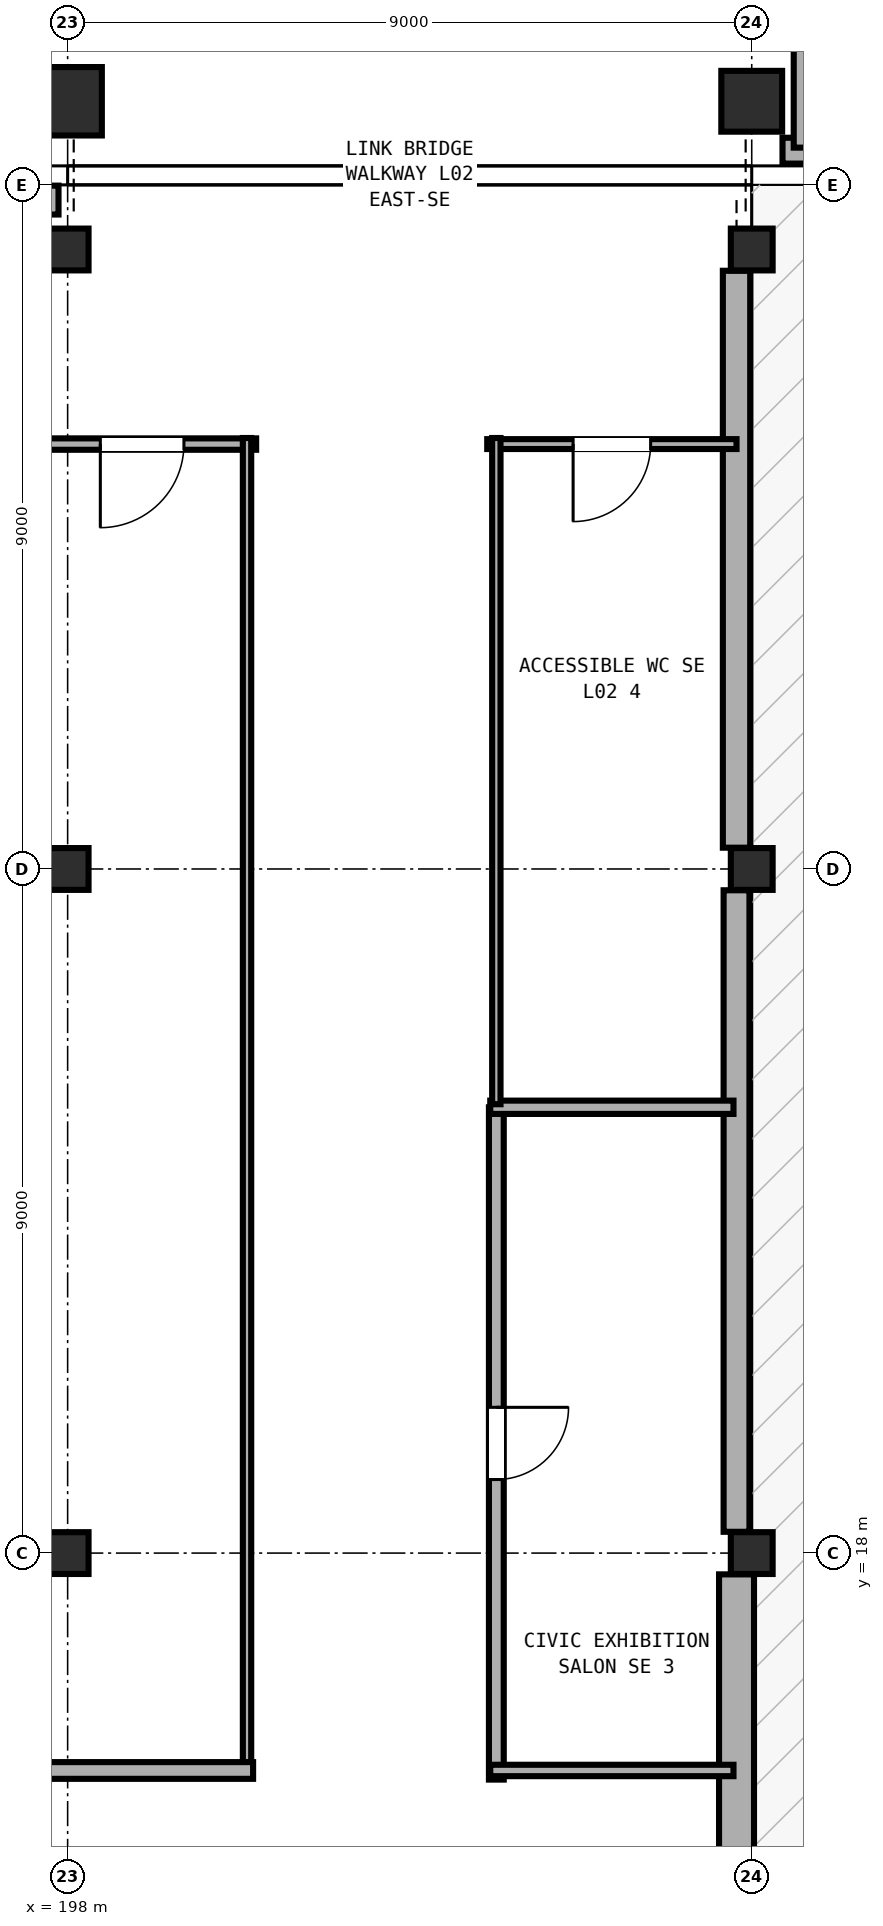
"""IFC4 building model, lengths in metres.
Left out: names, types, materials, properties, quantities, classifications, styles, units other than length and angle.
Written with IfcOpenShell. Run it as: python <this file> out.ifc"""

import sys

from ifc_helpers import new_model, si_unit, direction, frame, frame_2d, origin, origin_2d, place, context, subcontext, project, spatial, rectangle, extrude, element, fill, save


model = new_model("IFC4")
c1 = context("Model", 3, precision=1e-05, world=origin(), true_north=direction((0.0, 1.0)))
c2 = subcontext(c1, "Body", "Model", "MODEL_VIEW")
j1 = project(units=[si_unit("LENGTHUNIT", "METRE"), si_unit("PLANEANGLEUNIT", "RADIAN")], contexts=[c1])
p1 = place(None, origin())
s1 = spatial("IfcSite", under=j1, at=p1, CompositionType="ELEMENT")
p2 = place(p1, origin())
s2 = spatial("IfcBuilding", under=s1, at=p2, CompositionType="ELEMENT")
p3 = place(p2, frame((0.0, 0.0, 9.6)))
s3 = spatial("IfcBuildingStorey", under=s2, at=p3, CompositionType="ELEMENT", Elevation=9.6)
p4 = place(p3, frame((198.0, 37.1, 0.0), z_axis=(0.0, 0.0, 1.0), x_axis=(1.0, 0.0, 0.0)))
e1 = element("IfcColumn", 1, at=p4, inside=s3, PredefinedType="COLUMN", context=c2, shape_type="SweptSolid", body=[
    extrude(rectangle(XDim=0.9, YDim=0.9, at=origin_2d()), origin(), (0.0, 0.0, 1.0), 4.8),
])
p5 = place(p3, frame((207.0, 37.1, 0.0), z_axis=(0.0, 0.0, 1.0), x_axis=(1.0, 0.0, 0.0)))
e2 = element("IfcColumn", 2, at=p5, inside=s3, PredefinedType="COLUMN", context=c2, shape_type="SweptSolid", body=[
    extrude(rectangle(XDim=0.8, YDim=0.8, at=origin_2d()), origin(), (0.0, 0.0, 1.0), 4.8),
])
for number, where, z_axis, x_axis in (
    (3, (198.0, 18.0, 0.0), (0.0, 0.0, 1.0), (1.0, 0.0, 0.0)),
    (4, (198.0, 27.0, 0.0), (0.0, 0.0, 1.0), (1.0, 0.0, 0.0)),
    (5, (198.0, 35.15, 0.0), (0.0, 0.0, 1.0), (1.0, 0.0, 0.0)),
    (6, (207.0, 18.0, 0.0), (0.0, 0.0, 1.0), (1.0, 0.0, 0.0)),
    (7, (207.0, 27.0, 0.0), (0.0, 0.0, 1.0), (1.0, 0.0, 0.0)),
    (8, (207.0, 35.15, 0.0), (0.0, 0.0, 1.0), (1.0, 0.0, 0.0)),
):
    element("IfcColumn", number, at=place(p3, frame(where, z_axis=z_axis, x_axis=x_axis)), inside=s3, PredefinedType="COLUMN", context=c2, shape_type="SweptSolid", body=[
        extrude(rectangle(XDim=0.55, YDim=0.55, at=origin_2d()), origin(), (0.0, 0.0, 1.0), 4.8),
    ])
p6 = place(p3, frame((215.595, 36.45, 0.0), z_axis=(0.0, 0.0, 1.0), x_axis=(-1.0, 0.0, 0.0)))
e9 = element("IfcWall", 9, at=p6, inside=s3, PredefinedType="SOLIDWALL", context=c2, shape_type="SweptSolid", body=[
    extrude(rectangle(XDim=8.19, YDim=0.34, at=frame_2d((4.095, 0.0))), origin(), (0.0, 0.0, 1.0), 3.58),
])
p7 = place(p6, frame((3.07, 0.0, 0.0)))
e10 = element("IfcOpeningElement", 10, at=p7, cuts=e9, PredefinedType="OPENING", context=c2, shape_type="SweptSolid", body=[
    extrude(rectangle(XDim=2.05, YDim=2.3, at=frame_2d((1.025, 1.15))), frame((0.0, 0.18, 0.0), z_axis=(0.0, -1.0, 0.0), x_axis=(1.0, 0.0, 0.0)), (0.0, 0.0, 1.0), 0.36),
])
p8 = place(p3, frame((188.96, 35.8, 0.0), z_axis=(0.0, 0.0, 1.0), x_axis=(1.0, 0.0, 0.0)))
e11 = element("IfcWall", 11, at=p8, inside=s3, PredefinedType="SOLIDWALL", context=c2, shape_type="SweptSolid", body=[
    extrude(rectangle(XDim=8.92, YDim=0.38, at=frame_2d((4.46, 0.0))), origin(), (0.0, 0.0, 1.0), 3.58),
])
p9 = place(p8, frame((2.91, 0.0, 0.9)))
e12 = element("IfcOpeningElement", 12, at=p9, cuts=e11, PredefinedType="OPENING", context=c2, shape_type="SweptSolid", body=[
    extrude(rectangle(XDim=3.1, YDim=2.1, at=frame_2d((1.55, 1.05))), frame((0.0, 0.2, 0.0), z_axis=(0.0, -1.0, 0.0), x_axis=(1.0, 0.0, 0.0)), (0.0, 0.0, 1.0), 0.4),
])
p10 = place(p3, frame((206.8, 34.87, 0.0), z_axis=(0.0, 0.0, 1.0), x_axis=(0.0, -1.0, 0.0)))
e13 = element("IfcWall", 13, at=p10, inside=s3, PredefinedType="SOLIDWALL", context=c2, shape_type="SweptSolid", body=[
    extrude(rectangle(XDim=7.59, YDim=0.36, at=frame_2d((3.795, 0.0))), origin(), (0.0, 0.0, 1.0), 3.58),
])
p11 = place(p3, frame((206.8, 26.72, 0.0), z_axis=(0.0, 0.0, 1.0), x_axis=(0.0, -1.0, 0.0)))
e14 = element("IfcWall", 14, at=p11, inside=s3, PredefinedType="SOLIDWALL", context=c2, shape_type="SweptSolid", body=[
    extrude(rectangle(XDim=8.44, YDim=0.34, at=frame_2d((4.22, 0.0))), origin(), (0.0, 0.0, 1.0), 3.58),
])
p12 = place(p3, frame((206.8, 17.72, 0.0), z_axis=(0.0, 0.0, 1.0), x_axis=(0.0, -1.0, 0.0)))
e15 = element("IfcWall", 15, at=p12, inside=s3, PredefinedType="SOLIDWALL", context=c2, shape_type="SweptSolid", body=[
    extrude(rectangle(XDim=8.44, YDim=0.46, at=frame_2d((4.22, 0.0))), origin(), (0.0, 0.0, 1.0), 3.58),
])
p13 = place(p3, frame((207.64, 36.49, 0.0), z_axis=(0.0, 0.0, 1.0), x_axis=(0.0, 1.0, 0.0)))
e16 = element("IfcWall", 16, at=p13, inside=s3, PredefinedType="PARTITIONING", context=c2, shape_type="SweptSolid", body=[
    extrude(rectangle(XDim=3.01, YDim=0.175, at=frame_2d((1.505, 0.0))), origin(), (0.0, 0.0, 1.0), 3.56),
])
p14 = place(p3, frame((200.48, 32.59, 0.0), z_axis=(0.0, 0.0, 1.0), x_axis=(-1.0, 0.0, 0.0)))
e17 = element("IfcWall", 17, at=p14, inside=s3, PredefinedType="PARTITIONING", context=c2, shape_type="SweptSolid", body=[
    extrude(rectangle(XDim=3.0, YDim=0.15, at=frame_2d((1.5, 0.0))), origin(), (0.0, 0.0, 1.0), 3.56),
])
p15 = place(p14, frame((0.95, 0.0, 0.0)))
e18 = element("IfcOpeningElement", 18, at=p15, cuts=e17, PredefinedType="OPENING", context=c2, shape_type="SweptSolid", body=[
    extrude(rectangle(XDim=1.1, YDim=2.1, at=frame_2d((0.55, 1.05))), frame((0.0, 0.085, 0.0), z_axis=(0.0, -1.0, 0.0), x_axis=(1.0, 0.0, 0.0)), (0.0, 0.0, 1.0), 0.17),
])
p16 = place(p3, frame((200.36, 32.67, 0.0), z_axis=(0.0, 0.0, 1.0), x_axis=(0.0, -1.0, 0.0)))
e19 = element("IfcWall", 19, at=p16, inside=s3, PredefinedType="PARTITIONING", context=c2, shape_type="SweptSolid", body=[
    extrude(rectangle(XDim=17.61, YDim=0.11, at=frame_2d((8.805, 0.0))), origin(), (0.0, 0.0, 1.0), 3.56),
])
p17 = place(p3, frame((200.44, 15.14, 0.0), z_axis=(0.0, 0.0, 1.0), x_axis=(-1.0, 0.0, 0.0)))
e20 = element("IfcWall", 20, at=p17, inside=s3, PredefinedType="PARTITIONING", context=c2, shape_type="SweptSolid", body=[
    extrude(rectangle(XDim=14.78, YDim=0.22, at=frame_2d((7.39, 0.0))), origin(), (0.0, 0.0, 1.0), 3.56),
])
p18 = place(p3, frame((203.64, 23.865, 0.0), z_axis=(0.0, 0.0, 1.0), x_axis=(0.0, -1.0, 0.0)))
e21 = element("IfcWall", 21, at=p18, inside=s3, PredefinedType="PARTITIONING", context=c2, shape_type="SweptSolid", body=[
    extrude(rectangle(XDim=8.845, YDim=0.195, at=frame_2d((4.422, 0.0))), origin(), (0.0, 0.0, 1.0), 3.56),
])
p19 = place(p18, frame((3.948, 0.0, 0.0)))
e22 = element("IfcOpeningElement", 22, at=p19, cuts=e21, PredefinedType="OPENING", context=c2, shape_type="SweptSolid", body=[
    extrude(rectangle(XDim=0.95, YDim=2.18, at=frame_2d((0.475, 1.09))), frame((0.0, 0.107, 0.0), z_axis=(0.0, -1.0, 0.0), x_axis=(1.0, 0.0, 0.0)), (0.0, 0.0, 1.0), 0.215),
])
p20 = place(p3, frame((203.56, 23.865, 0.0), z_axis=(0.0, 0.0, 1.0), x_axis=(1.0, 0.0, 0.0)))
e23 = element("IfcWall", 23, at=p20, inside=s3, PredefinedType="PARTITIONING", context=c2, shape_type="SweptSolid", body=[
    extrude(rectangle(XDim=3.2, YDim=0.175, at=frame_2d((1.6, 0.0))), origin(), (0.0, 0.0, 1.0), 3.56),
])
p21 = place(p3, frame((206.76, 15.14, 0.0), z_axis=(0.0, 0.0, 1.0), x_axis=(-1.0, 0.0, 0.0)))
e24 = element("IfcWall", 24, at=p21, inside=s3, PredefinedType="PARTITIONING", context=c2, shape_type="SweptSolid", body=[
    extrude(rectangle(XDim=3.2, YDim=0.15, at=frame_2d((1.6, 0.0))), origin(), (0.0, 0.0, 1.0), 3.56),
])
p22 = place(p3, frame((206.8, 32.59, 0.0), z_axis=(0.0, 0.0, 1.0), x_axis=(-1.0, 0.0, 0.0)))
e25 = element("IfcWall", 25, at=p22, inside=s3, PredefinedType="PARTITIONING", context=c2, shape_type="SweptSolid", body=[
    extrude(rectangle(XDim=3.28, YDim=0.13, at=frame_2d((1.64, 0.0))), origin(), (0.0, 0.0, 1.0), 3.56),
])
p23 = place(p22, frame((1.13, 0.0, 0.0)))
e26 = element("IfcOpeningElement", 26, at=p23, cuts=e25, PredefinedType="OPENING", context=c2, shape_type="SweptSolid", body=[
    extrude(rectangle(XDim=1.02, YDim=2.16, at=frame_2d((0.51, 1.08))), frame((0.0, 0.075, 0.0), z_axis=(0.0, -1.0, 0.0), x_axis=(1.0, 0.0, 0.0)), (0.0, 0.0, 1.0), 0.15),
])
p24 = place(p3, frame((203.64, 23.905, 0.0), z_axis=(0.0, 0.0, 1.0), x_axis=(0.0, 1.0, 0.0)))
e27 = element("IfcWall", 27, at=p24, inside=s3, PredefinedType="PARTITIONING", context=c2, shape_type="SweptSolid", body=[
    extrude(rectangle(XDim=8.765, YDim=0.11, at=frame_2d((4.382, 0.0))), origin(), (0.0, 0.0, 1.0), 3.56),
])
p25 = place(p15, origin())
e28 = element("IfcDoor", 28, at=p25, inside=s3, OperationType="SINGLE_SWING_RIGHT", PredefinedType="DOOR", context=c2, shape_type="SweptSolid", body=[
    extrude(rectangle(XDim=1.1, YDim=2.1, at=frame_2d((0.55, 1.05))), frame((0.0, 0.025, 0.0), z_axis=(0.0, -1.0, 0.0), x_axis=(1.0, 0.0, 0.0)), (0.0, 0.0, 1.0), 0.05),
])
fill(e18, e28)
p26 = place(p19, origin())
e29 = element("IfcDoor", 29, at=p26, inside=s3, OperationType="SINGLE_SWING_LEFT", PredefinedType="DOOR", context=c2, shape_type="SweptSolid", body=[
    extrude(rectangle(XDim=0.95, YDim=2.18, at=frame_2d((0.475, 1.09))), frame((0.0, 0.025, 0.0), z_axis=(0.0, -1.0, 0.0), x_axis=(1.0, 0.0, 0.0)), (0.0, 0.0, 1.0), 0.05),
])
fill(e22, e29)
p27 = place(p23, origin())
e30 = element("IfcDoor", 30, at=p27, inside=s3, OperationType="SINGLE_SWING_RIGHT", PredefinedType="DOOR", context=c2, shape_type="SweptSolid", body=[
    extrude(rectangle(XDim=1.02, YDim=2.16, at=frame_2d((0.51, 1.08))), frame((0.0, 0.025, 0.0), z_axis=(0.0, -1.0, 0.0), x_axis=(1.0, 0.0, 0.0)), (0.0, 0.0, 1.0), 0.05),
])
fill(e26, e30)
save(model, sys.argv[1])
